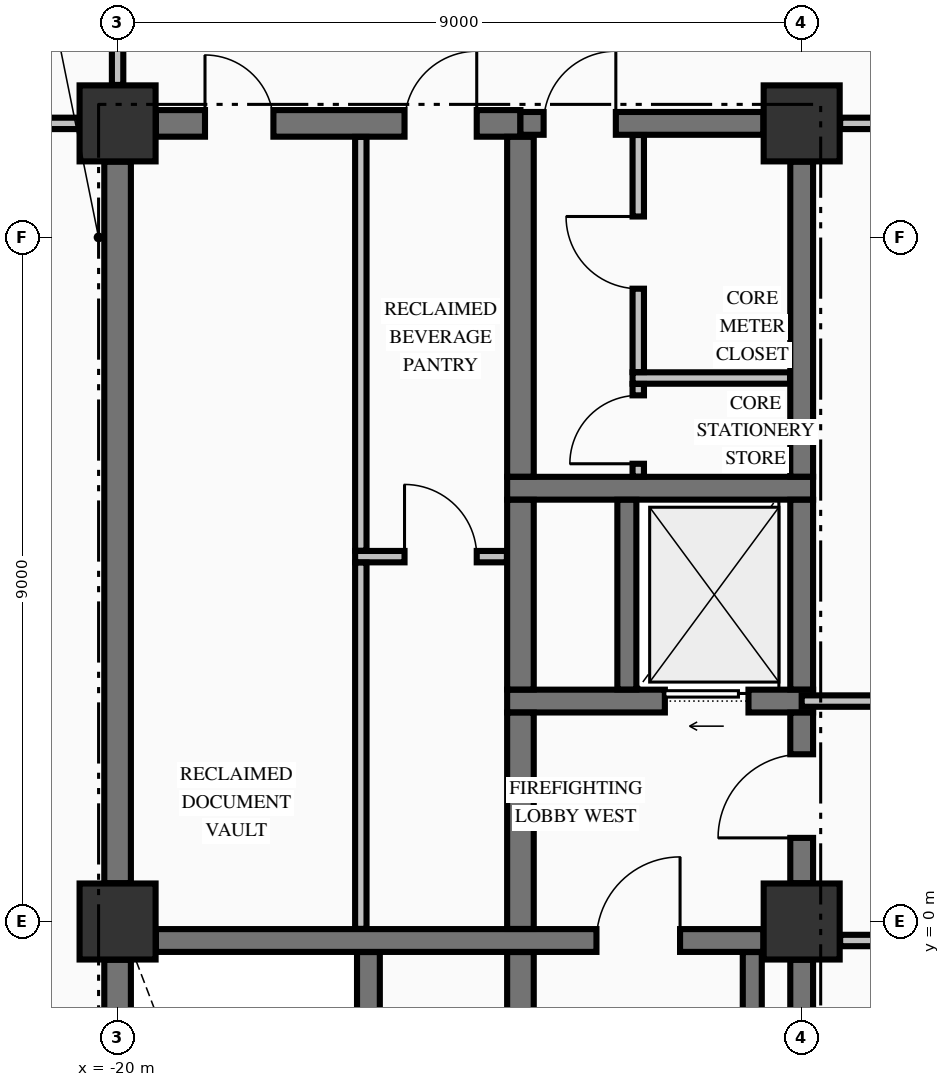
"""IFC4 building model, lengths in metres.
Left out: names, types, materials, properties, quantities, classifications, styles, units other than length and angle.
Written with IfcOpenShell. Run it as: python <this file> out.ifc"""

import sys

from ifc_helpers import new_model, si_unit, direction, frame, frame_2d, origin, origin_2d, place, context, subcontext, project, spatial, rectangle, extrude, element, fill, save


model = new_model("IFC4")
c1 = context("Model", 3, precision=1e-05, world=origin(), true_north=direction((0.0, 1.0)))
c2 = subcontext(c1, "Body", "Model", "MODEL_VIEW")
j1 = project(units=[si_unit("LENGTHUNIT", "METRE"), si_unit("PLANEANGLEUNIT", "RADIAN")], contexts=[c1])
p1 = place(None, origin())
s1 = spatial("IfcSite", under=j1, at=p1, CompositionType="ELEMENT")
p2 = place(p1, origin())
s2 = spatial("IfcBuilding", under=s1, at=p2, CompositionType="ELEMENT")
p3 = place(p2, frame((0.0, 0.0, 132.06)))
s3 = spatial("IfcBuildingStorey", under=s2, at=p3, CompositionType="ELEMENT", Elevation=132.06)
for number, where, z_axis, x_axis in (
    (1, (-20.0, 10.5, -0.25), (0.0, 0.0, 1.0), (1.0, 0.0, 0.0)),
    (2, (-11.0, 0.0, -0.25), (0.0, 0.0, 1.0), (1.0, 0.0, 0.0)),
    (3, (-11.0, 10.5, -0.25), (0.0, 0.0, 1.0), (1.0, 0.0, 0.0)),
    (4, (-20.0, 0.0, -0.25), (0.0, 0.0, 1.0), (1.0, 0.0, 0.0)),
):
    element("IfcColumn", number, at=place(p3, frame(where, z_axis=z_axis, x_axis=x_axis)), inside=s3, PredefinedType="COLUMN", context=c2, shape_type="SweptSolid", body=[
        extrude(rectangle(XDim=1.0, YDim=1.0, at=origin_2d()), origin(), (0.0, 0.0, 1.0), 3.57),
    ])
p4 = place(p3, frame((-19.496, -0.25, 0.0), z_axis=(0.0, 0.0, 1.0), x_axis=(1.0, 0.0, 0.0)))
e5 = element("IfcWall", 5, at=p4, inside=s3, PredefinedType="SHEAR", context=c2, shape_type="SweptSolid", body=[
    extrude(rectangle(XDim=7.992, YDim=0.3, at=frame_2d((3.996, 0.0))), origin(), (0.0, 0.0, 1.0), 3.32),
])
p5 = place(p4, frame((5.796, 0.0, 0.0)))
e6 = element("IfcOpeningElement", 6, at=p5, cuts=e5, PredefinedType="OPENING", context=c2, shape_type="SweptSolid", body=[
    extrude(rectangle(XDim=1.1, YDim=2.15, at=frame_2d((0.55, 1.075))), frame((0.0, 0.16, 0.0), z_axis=(0.0, -1.0, 0.0), x_axis=(1.0, 0.0, 0.0)), (0.0, 0.0, 1.0), 0.32),
])
p6 = place(p3, frame((-14.875, 2.9, 0.0), z_axis=(0.0, 0.0, 1.0), x_axis=(1.0, 0.0, 0.0)))
e7 = element("IfcWall", 7, at=p6, inside=s3, PredefinedType="SHEAR", context=c2, shape_type="SweptSolid", body=[
    extrude(rectangle(XDim=4.025, YDim=0.3, at=frame_2d((2.012, 0.0))), origin(), (0.0, 0.0, 1.0), 3.32),
])
p7 = place(p6, frame((2.075, 0.0, 0.0)))
e8 = element("IfcOpeningElement", 8, at=p7, cuts=e7, PredefinedType="OPENING", context=c2, shape_type="SweptSolid", body=[
    extrude(rectangle(XDim=1.1, YDim=2.2, at=frame_2d((0.55, 1.1))), frame((0.0, 0.16, 0.0), z_axis=(0.0, -1.0, 0.0), x_axis=(1.0, 0.0, 0.0)), (0.0, 0.0, 1.0), 0.32),
])
p8 = place(p3, frame((-14.875, 5.7, 0.0), z_axis=(0.0, 0.0, 1.0), x_axis=(1.0, 0.0, 0.0)))
e9 = element("IfcWall", 9, at=p8, inside=s3, PredefinedType="SHEAR", context=c2, shape_type="SweptSolid", body=[
    extrude(rectangle(XDim=4.025, YDim=0.3, at=frame_2d((2.012, 0.0))), origin(), (0.0, 0.0, 1.0), 3.32),
])
p9 = place(p3, frame((-19.496, 10.5, 0.0), z_axis=(0.0, 0.0, 1.0), x_axis=(1.0, 0.0, 0.0)))
e10 = element("IfcWall", 10, at=p9, inside=s3, PredefinedType="SHEAR", context=c2, shape_type="SweptSolid", body=[
    extrude(rectangle(XDim=4.796, YDim=0.35, at=frame_2d((2.398, 0.0))), origin(), (0.0, 0.0, 1.0), 3.32),
])
p10 = place(p9, frame((0.646, 0.0, 0.0)))
e11 = element("IfcOpeningElement", 11, at=p10, cuts=e10, PredefinedType="OPENING", context=c2, shape_type="SweptSolid", body=[
    extrude(rectangle(XDim=0.9, YDim=2.15, at=frame_2d((0.45, 1.075))), frame((0.0, 0.185, 0.0), z_axis=(0.0, -1.0, 0.0), x_axis=(1.0, 0.0, 0.0)), (0.0, 0.0, 1.0), 0.37),
])
p11 = place(p9, frame((3.271, 0.0, 0.0)))
e12 = element("IfcOpeningElement", 12, at=p11, cuts=e10, PredefinedType="OPENING", context=c2, shape_type="SweptSolid", body=[
    extrude(rectangle(XDim=0.95, YDim=2.15, at=frame_2d((0.475, 1.075))), frame((0.0, 0.185, 0.0), z_axis=(0.0, -1.0, 0.0), x_axis=(1.0, 0.0, 0.0)), (0.0, 0.0, 1.0), 0.37),
])
p12 = place(p3, frame((-14.7, 10.5, 0.0), z_axis=(0.0, 0.0, 1.0), x_axis=(1.0, 0.0, 0.0)))
e13 = element("IfcWall", 13, at=p12, inside=s3, PredefinedType="SHEAR", context=c2, shape_type="SweptSolid", body=[
    extrude(rectangle(XDim=3.196, YDim=0.3, at=frame_2d((1.598, 0.0))), origin(), (0.0, 0.0, 1.0), 3.32),
])
p13 = place(p12, frame((0.305, 0.0, 0.0)))
e14 = element("IfcOpeningElement", 14, at=p13, cuts=e13, PredefinedType="OPENING", context=c2, shape_type="SweptSolid", body=[
    extrude(rectangle(XDim=0.95, YDim=2.15, at=frame_2d((0.475, 1.075))), frame((0.0, 0.16, 0.0), z_axis=(0.0, -1.0, 0.0), x_axis=(1.0, 0.0, 0.0)), (0.0, 0.0, 1.0), 0.32),
])
p14 = place(p3, frame((-10.494, -0.25, 0.0), z_axis=(0.0, 0.0, 1.0), x_axis=(1.0, 0.0, 0.0)))
e15 = element("IfcWall", 15, at=p14, inside=s3, PredefinedType="PARTITIONING", context=c2, shape_type="SweptSolid", body=[
    extrude(rectangle(XDim=20.988, YDim=0.15, at=frame_2d((10.494, 0.0))), origin(), (0.0, 0.0, 1.0), 3.32),
])
p15 = place(p14, frame((6.944, 0.0, 0.0)))
e16 = element("IfcOpeningElement", 16, at=p15, cuts=e15, PredefinedType="OPENING", context=c2, shape_type="SweptSolid", body=[
    extrude(rectangle(XDim=1.1, YDim=2.15, at=frame_2d((0.55, 1.075))), frame((0.0, 0.085, 0.0), z_axis=(0.0, -1.0, 0.0), x_axis=(1.0, 0.0, 0.0)), (0.0, 0.0, 1.0), 0.17),
])
p16 = place(p14, frame((2.419, 0.0, 0.0)))
e17 = element("IfcOpeningElement", 17, at=p16, cuts=e15, PredefinedType="OPENING", context=c2, shape_type="SweptSolid", body=[
    extrude(rectangle(XDim=1.05, YDim=2.15, at=frame_2d((0.525, 1.075))), frame((0.0, 0.085, 0.0), z_axis=(0.0, -1.0, 0.0), x_axis=(1.0, 0.0, 0.0)), (0.0, 0.0, 1.0), 0.17),
])
p17 = place(p14, frame((14.569, 0.0, 0.0)))
e18 = element("IfcOpeningElement", 18, at=p17, cuts=e15, PredefinedType="OPENING", context=c2, shape_type="SweptSolid", body=[
    extrude(rectangle(XDim=0.95, YDim=2.15, at=frame_2d((0.475, 1.075))), frame((0.0, 0.085, 0.0), z_axis=(0.0, -1.0, 0.0), x_axis=(1.0, 0.0, 0.0)), (0.0, 0.0, 1.0), 0.17),
])
p18 = place(p3, frame((-11.0, 2.9, 0.0), z_axis=(0.0, 0.0, 1.0), x_axis=(1.0, 0.0, 0.0)))
e19 = element("IfcWall", 19, at=p18, inside=s3, PredefinedType="PARTITIONING", context=c2, shape_type="SweptSolid", body=[
    extrude(rectangle(XDim=22.0, YDim=0.15, at=frame_2d((11.0, 0.0))), origin(), (0.0, 0.0, 1.0), 3.32),
])
p19 = place(p18, frame((7.45, 0.0, 0.0)))
e20 = element("IfcOpeningElement", 20, at=p19, cuts=e19, PredefinedType="OPENING", context=c2, shape_type="SweptSolid", body=[
    extrude(rectangle(XDim=1.1, YDim=2.15, at=frame_2d((0.55, 1.075))), frame((0.0, 0.085, 0.0), z_axis=(0.0, -1.0, 0.0), x_axis=(1.0, 0.0, 0.0)), (0.0, 0.0, 1.0), 0.17),
])
p20 = place(p18, frame((2.925, 0.0, 0.0)))
e21 = element("IfcOpeningElement", 21, at=p20, cuts=e19, PredefinedType="OPENING", context=c2, shape_type="SweptSolid", body=[
    extrude(rectangle(XDim=1.05, YDim=2.15, at=frame_2d((0.525, 1.075))), frame((0.0, 0.085, 0.0), z_axis=(0.0, -1.0, 0.0), x_axis=(1.0, 0.0, 0.0)), (0.0, 0.0, 1.0), 0.17),
])
p21 = place(p18, frame((11.275, 0.0, 0.0)))
e22 = element("IfcOpeningElement", 22, at=p21, cuts=e19, PredefinedType="OPENING", context=c2, shape_type="SweptSolid", body=[
    extrude(rectangle(XDim=0.95, YDim=2.15, at=frame_2d((0.475, 1.075))), frame((0.0, 0.085, 0.0), z_axis=(0.0, -1.0, 0.0), x_axis=(1.0, 0.0, 0.0)), (0.0, 0.0, 1.0), 0.17),
])
p22 = place(p18, frame((17.725, 0.0, 0.0)))
e23 = element("IfcOpeningElement", 23, at=p22, cuts=e19, PredefinedType="OPENING", context=c2, shape_type="SweptSolid", body=[
    extrude(rectangle(XDim=0.95, YDim=2.15, at=frame_2d((0.475, 1.075))), frame((0.0, 0.085, 0.0), z_axis=(0.0, -1.0, 0.0), x_axis=(1.0, 0.0, 0.0)), (0.0, 0.0, 1.0), 0.17),
])
p23 = place(p3, frame((-16.875, 4.8, 0.0), z_axis=(0.0, 0.0, 1.0), x_axis=(1.0, 0.0, 0.0)))
e24 = element("IfcWall", 24, at=p23, inside=s3, PredefinedType="PARTITIONING", context=c2, shape_type="SweptSolid", body=[
    extrude(rectangle(XDim=1.997, YDim=0.15, at=frame_2d((0.999, 0.0))), origin(), (0.0, 0.0, 1.0), 3.32),
])
p24 = place(p23, frame((0.65, 0.0, 0.0)))
e25 = element("IfcOpeningElement", 25, at=p24, cuts=e24, PredefinedType="OPENING", context=c2, shape_type="SweptSolid", body=[
    extrude(rectangle(XDim=0.95, YDim=2.15, at=frame_2d((0.475, 1.075))), frame((0.0, 0.085, 0.0), z_axis=(0.0, -1.0, 0.0), x_axis=(1.0, 0.0, 0.0)), (0.0, 0.0, 1.0), 0.17),
])
p25 = place(p3, frame((-13.225, 7.15, 0.0), z_axis=(0.0, 0.0, 1.0), x_axis=(1.0, 0.0, 0.0)))
e26 = element("IfcWall", 26, at=p25, inside=s3, PredefinedType="PARTITIONING", context=c2, shape_type="SweptSolid", body=[
    extrude(rectangle(XDim=2.072, YDim=0.15, at=frame_2d((1.036, 0.0))), origin(), (0.0, 0.0, 1.0), 3.32),
])
p26 = place(p3, frame((-27.835, 10.5, 0.0), z_axis=(0.0, 0.0, 1.0), x_axis=(1.0, 0.0, 0.0)))
e27 = element("IfcWall", 27, at=p26, inside=s3, PredefinedType="PARTITIONING", context=c2, shape_type="SweptSolid", body=[
    extrude(rectangle(XDim=7.329, YDim=0.15, at=frame_2d((3.665, 0.0))), origin(), (0.0, 0.0, 1.0), 3.32),
])
p27 = place(p26, frame((3.335, 0.0, 0.0)))
e28 = element("IfcOpeningElement", 28, at=p27, cuts=e27, PredefinedType="OPENING", context=c2, shape_type="SweptSolid", body=[
    extrude(rectangle(XDim=1.0, YDim=2.15, at=frame_2d((0.5, 1.075))), frame((0.0, 0.085, 0.0), z_axis=(0.0, -1.0, 0.0), x_axis=(1.0, 0.0, 0.0)), (0.0, 0.0, 1.0), 0.17),
])
p28 = place(p3, frame((-10.494, 10.5, 0.0), z_axis=(0.0, 0.0, 1.0), x_axis=(1.0, 0.0, 0.0)))
e29 = element("IfcWall", 29, at=p28, inside=s3, PredefinedType="PARTITIONING", context=c2, shape_type="SweptSolid", body=[
    extrude(rectangle(XDim=20.988, YDim=0.15, at=frame_2d((10.494, 0.0))), origin(), (0.0, 0.0, 1.0), 3.32),
])
p29 = place(p28, frame((6.944, 0.0, 0.0)))
e30 = element("IfcOpeningElement", 30, at=p29, cuts=e29, PredefinedType="OPENING", context=c2, shape_type="SweptSolid", body=[
    extrude(rectangle(XDim=1.1, YDim=2.15, at=frame_2d((0.55, 1.075))), frame((0.0, 0.085, 0.0), z_axis=(0.0, -1.0, 0.0), x_axis=(1.0, 0.0, 0.0)), (0.0, 0.0, 1.0), 0.17),
])
p30 = place(p3, frame((-20.0, -9.446, 0.0), z_axis=(0.0, 0.0, 1.0), x_axis=(0.0, 1.0, 0.0)))
e31 = element("IfcWall", 31, at=p30, inside=s3, PredefinedType="SHEAR", context=c2, shape_type="SweptSolid", body=[
    extrude(rectangle(XDim=8.942, YDim=0.35, at=frame_2d((4.471, 0.0))), origin(), (0.0, 0.0, 1.0), 3.32),
])
p31 = place(p3, frame((-20.0, 0.504, 0.0), z_axis=(0.0, 0.0, 1.0), x_axis=(0.0, 1.0, 0.0)))
e32 = element("IfcWall", 32, at=p31, inside=s3, PredefinedType="SHEAR", context=c2, shape_type="SweptSolid", body=[
    extrude(rectangle(XDim=9.492, YDim=0.35, at=frame_2d((4.746, 0.0))), origin(), (0.0, 0.0, 1.0), 3.32),
])
p32 = place(p3, frame((-16.7, -9.773, 0.0), z_axis=(0.0, 0.0, 1.0), x_axis=(0.0, 1.0, 0.0)))
e33 = element("IfcWall", 33, at=p32, inside=s3, PredefinedType="SHEAR", context=c2, shape_type="SweptSolid", body=[
    extrude(rectangle(XDim=9.371, YDim=0.3, at=frame_2d((4.686, 0.0))), origin(), (0.0, 0.0, 1.0), 3.32),
])
p33 = place(p3, frame((-14.7, -9.773, 0.0), z_axis=(0.0, 0.0, 1.0), x_axis=(0.0, 1.0, 0.0)))
e34 = element("IfcWall", 34, at=p33, inside=s3, PredefinedType="SHEAR", context=c2, shape_type="SweptSolid", body=[
    extrude(rectangle(XDim=9.371, YDim=0.35, at=frame_2d((4.686, 0.0))), origin(), (0.0, 0.0, 1.0), 3.32),
])
p34 = place(p3, frame((-14.7, -0.098, 0.0), z_axis=(0.0, 0.0, 1.0), x_axis=(0.0, 1.0, 0.0)))
e35 = element("IfcWall", 35, at=p34, inside=s3, PredefinedType="SHEAR", context=c2, shape_type="SweptSolid", body=[
    extrude(rectangle(XDim=2.846, YDim=0.35, at=frame_2d((1.423, 0.0))), origin(), (0.0, 0.0, 1.0), 3.32),
])
p35 = place(p3, frame((-14.7, 3.052, 0.0), z_axis=(0.0, 0.0, 1.0), x_axis=(0.0, 1.0, 0.0)))
e36 = element("IfcWall", 36, at=p35, inside=s3, PredefinedType="SHEAR", context=c2, shape_type="SweptSolid", body=[
    extrude(rectangle(XDim=2.496, YDim=0.35, at=frame_2d((1.248, 0.0))), origin(), (0.0, 0.0, 1.0), 3.32),
])
p36 = place(p3, frame((-14.7, 5.852, 0.0), z_axis=(0.0, 0.0, 1.0), x_axis=(0.0, 1.0, 0.0)))
e37 = element("IfcWall", 37, at=p36, inside=s3, PredefinedType="SHEAR", context=c2, shape_type="SweptSolid", body=[
    extrude(rectangle(XDim=4.471, YDim=0.35, at=frame_2d((2.235, 0.0))), origin(), (0.0, 0.0, 1.0), 3.32),
])
p37 = place(p3, frame((-13.3, 3.052, 0.0), z_axis=(0.0, 0.0, 1.0), x_axis=(0.0, 1.0, 0.0)))
e38 = element("IfcWall", 38, at=p37, inside=s3, PredefinedType="SOLIDWALL", context=c2, shape_type="SweptSolid", body=[
    extrude(rectangle(XDim=2.496, YDim=0.25, at=frame_2d((1.248, 0.0))), origin(), (0.0, 0.0, 1.0), 3.32),
])
p38 = place(p3, frame((-11.65, -9.798, 0.0), z_axis=(0.0, 0.0, 1.0), x_axis=(0.0, 1.0, 0.0)))
e39 = element("IfcWall", 39, at=p38, inside=s3, PredefinedType="SOLIDWALL", context=c2, shape_type="SweptSolid", body=[
    extrude(rectangle(XDim=9.396, YDim=0.25, at=frame_2d((4.698, 0.0))), origin(), (0.0, 0.0, 1.0), 3.32),
])
p39 = place(p3, frame((-11.0, -9.446, 0.0), z_axis=(0.0, 0.0, 1.0), x_axis=(0.0, 1.0, 0.0)))
e40 = element("IfcWall", 40, at=p39, inside=s3, PredefinedType="SHEAR", context=c2, shape_type="SweptSolid", body=[
    extrude(rectangle(XDim=8.942, YDim=0.3, at=frame_2d((4.471, 0.0))), origin(), (0.0, 0.0, 1.0), 3.32),
])
p40 = place(p3, frame((-11.0, 0.504, 0.0), z_axis=(0.0, 0.0, 1.0), x_axis=(0.0, 1.0, 0.0)))
e41 = element("IfcWall", 41, at=p40, inside=s3, PredefinedType="SHEAR", context=c2, shape_type="SweptSolid", body=[
    extrude(rectangle(XDim=2.244, YDim=0.3, at=frame_2d((1.122, 0.0))), origin(), (0.0, 0.0, 1.0), 3.32),
])
p41 = place(p40, frame((0.596, 0.0, 0.0)))
e42 = element("IfcOpeningElement", 42, at=p41, cuts=e41, PredefinedType="OPENING", context=c2, shape_type="SweptSolid", body=[
    extrude(rectangle(XDim=1.1, YDim=2.15, at=frame_2d((0.55, 1.075))), frame((0.0, 0.16, 0.0), z_axis=(0.0, -1.0, 0.0), x_axis=(1.0, 0.0, 0.0)), (0.0, 0.0, 1.0), 0.32),
])
p42 = place(p3, frame((-11.0, 3.052, 0.0), z_axis=(0.0, 0.0, 1.0), x_axis=(0.0, 1.0, 0.0)))
e43 = element("IfcWall", 43, at=p42, inside=s3, PredefinedType="SHEAR", context=c2, shape_type="SweptSolid", body=[
    extrude(rectangle(XDim=2.496, YDim=0.3, at=frame_2d((1.248, 0.0))), origin(), (0.0, 0.0, 1.0), 3.32),
])
p43 = place(p3, frame((-11.0, 5.852, 0.0), z_axis=(0.0, 0.0, 1.0), x_axis=(0.0, 1.0, 0.0)))
e44 = element("IfcWall", 44, at=p43, inside=s3, PredefinedType="SHEAR", context=c2, shape_type="SweptSolid", body=[
    extrude(rectangle(XDim=4.144, YDim=0.3, at=frame_2d((2.072, 0.0))), origin(), (0.0, 0.0, 1.0), 3.32),
])
p44 = place(p3, frame((-20.0, 11.006, 0.0), z_axis=(0.0, 0.0, 1.0), x_axis=(0.0, 1.0, 0.0)))
e45 = element("IfcWall", 45, at=p44, inside=s3, PredefinedType="PARTITIONING", context=c2, shape_type="SweptSolid", body=[
    extrude(rectangle(XDim=2.716, YDim=0.15, at=frame_2d((1.358, 0.0))), origin(), (0.0, 0.0, 1.0), 2.81),
])
p45 = place(p44, frame((0.669, 0.0, 0.0)))
e46 = element("IfcOpeningElement", 46, at=p45, cuts=e45, PredefinedType="OPENING", context=c2, shape_type="SweptSolid", body=[
    extrude(rectangle(XDim=0.95, YDim=2.15, at=frame_2d((0.475, 1.075))), frame((0.0, 0.085, 0.0), z_axis=(0.0, -1.0, 0.0), x_axis=(1.0, 0.0, 0.0)), (0.0, 0.0, 1.0), 0.17),
])
p46 = place(p3, frame((-16.8, -0.097, 0.0), z_axis=(0.0, 0.0, 1.0), x_axis=(0.0, 1.0, 0.0)))
e47 = element("IfcWall", 47, at=p46, inside=s3, PredefinedType="PARTITIONING", context=c2, shape_type="SweptSolid", body=[
    extrude(rectangle(XDim=4.819, YDim=0.15, at=frame_2d((2.409, 0.0))), origin(), (0.0, 0.0, 1.0), 3.32),
])
p47 = place(p3, frame((-16.8, 4.878, 0.0), z_axis=(0.0, 0.0, 1.0), x_axis=(0.0, 1.0, 0.0)))
e48 = element("IfcWall", 48, at=p47, inside=s3, PredefinedType="PARTITIONING", context=c2, shape_type="SweptSolid", body=[
    extrude(rectangle(XDim=5.444, YDim=0.15, at=frame_2d((2.722, 0.0))), origin(), (0.0, 0.0, 1.0), 3.32),
])
p48 = place(p3, frame((-13.15, 5.853, 0.0), z_axis=(0.0, 0.0, 1.0), x_axis=(0.0, 1.0, 0.0)))
e49 = element("IfcWall", 49, at=p48, inside=s3, PredefinedType="PARTITIONING", context=c2, shape_type="SweptSolid", body=[
    extrude(rectangle(XDim=1.219, YDim=0.15, at=frame_2d((0.609, 0.0))), origin(), (0.0, 0.0, 1.0), 3.32),
])
p49 = place(p48, frame((0.169, 0.0, 0.0)))
e50 = element("IfcOpeningElement", 50, at=p49, cuts=e49, PredefinedType="OPENING", context=c2, shape_type="SweptSolid", body=[
    extrude(rectangle(XDim=0.9, YDim=2.15, at=frame_2d((0.45, 1.075))), frame((0.0, 0.085, 0.0), z_axis=(0.0, -1.0, 0.0), x_axis=(1.0, 0.0, 0.0)), (0.0, 0.0, 1.0), 0.17),
])
p50 = place(p3, frame((-13.15, 7.228, 0.0), z_axis=(0.0, 0.0, 1.0), x_axis=(0.0, 1.0, 0.0)))
e51 = element("IfcWall", 51, at=p50, inside=s3, PredefinedType="PARTITIONING", context=c2, shape_type="SweptSolid", body=[
    extrude(rectangle(XDim=3.119, YDim=0.15, at=frame_2d((1.56, 0.0))), origin(), (0.0, 0.0, 1.0), 3.32),
])
p51 = place(p50, frame((1.097, 0.0, 0.0)))
e52 = element("IfcOpeningElement", 52, at=p51, cuts=e51, PredefinedType="OPENING", context=c2, shape_type="SweptSolid", body=[
    extrude(rectangle(XDim=0.95, YDim=2.15, at=frame_2d((0.475, 1.075))), frame((0.0, 0.085, 0.0), z_axis=(0.0, -1.0, 0.0), x_axis=(1.0, 0.0, 0.0)), (0.0, 0.0, 1.0), 0.17),
])
p52 = place(p5, origin())
e53 = element("IfcDoor", 53, at=p52, inside=s3, OperationType="SINGLE_SWING_RIGHT", PredefinedType="DOOR", context=c2, shape_type="SweptSolid", body=[
    extrude(rectangle(XDim=1.1, YDim=2.15, at=frame_2d((0.55, 1.075))), frame((0.0, 0.025, 0.0), z_axis=(0.0, -1.0, 0.0), x_axis=(1.0, 0.0, 0.0)), (0.0, 0.0, 1.0), 0.05),
])
fill(e6, e53)
p53 = place(p41, origin())
e54 = element("IfcDoor", 54, at=p53, inside=s3, OperationType="SINGLE_SWING_LEFT", PredefinedType="DOOR", context=c2, shape_type="SweptSolid", body=[
    extrude(rectangle(XDim=1.1, YDim=2.15, at=frame_2d((0.55, 1.075))), frame((0.0, 0.025, 0.0), z_axis=(0.0, -1.0, 0.0), x_axis=(1.0, 0.0, 0.0)), (0.0, 0.0, 1.0), 0.05),
])
fill(e42, e54)
p54 = place(p7, origin())
e55 = element("IfcDoor", 55, at=p54, inside=s3, OperationType="SLIDING_TO_LEFT", PredefinedType="DOOR", context=c2, shape_type="SweptSolid", body=[
    extrude(rectangle(XDim=1.1, YDim=2.2, at=frame_2d((0.55, 1.1))), frame((0.0, 0.025, 0.0), z_axis=(0.0, -1.0, 0.0), x_axis=(1.0, 0.0, 0.0)), (0.0, 0.0, 1.0), 0.05),
])
fill(e8, e55)
p55 = place(p13, origin())
e56 = element("IfcDoor", 56, at=p55, inside=s3, OperationType="SINGLE_SWING_RIGHT", PredefinedType="DOOR", context=c2, shape_type="SweptSolid", body=[
    extrude(rectangle(XDim=0.95, YDim=2.15, at=frame_2d((0.475, 1.075))), frame((0.0, 0.025, 0.0), z_axis=(0.0, -1.0, 0.0), x_axis=(1.0, 0.0, 0.0)), (0.0, 0.0, 1.0), 0.05),
])
fill(e14, e56)
p56 = place(p49, origin())
e57 = element("IfcDoor", 57, at=p56, inside=s3, OperationType="SINGLE_SWING_LEFT", PredefinedType="DOOR", context=c2, shape_type="SweptSolid", body=[
    extrude(rectangle(XDim=0.9, YDim=2.15, at=frame_2d((0.45, 1.075))), frame((0.0, 0.025, 0.0), z_axis=(0.0, -1.0, 0.0), x_axis=(1.0, 0.0, 0.0)), (0.0, 0.0, 1.0), 0.05),
])
fill(e50, e57)
p57 = place(p51, origin())
e58 = element("IfcDoor", 58, at=p57, inside=s3, OperationType="SINGLE_SWING_RIGHT", PredefinedType="DOOR", context=c2, shape_type="SweptSolid", body=[
    extrude(rectangle(XDim=0.95, YDim=2.15, at=frame_2d((0.475, 1.075))), frame((0.0, 0.025, 0.0), z_axis=(0.0, -1.0, 0.0), x_axis=(1.0, 0.0, 0.0)), (0.0, 0.0, 1.0), 0.05),
])
fill(e52, e58)
p58 = place(p10, origin())
e59 = element("IfcDoor", 59, at=p58, inside=s3, OperationType="SINGLE_SWING_LEFT", PredefinedType="DOOR", context=c2, shape_type="SweptSolid", body=[
    extrude(rectangle(XDim=0.9, YDim=2.15, at=frame_2d((0.45, 1.075))), frame((0.0, 0.025, 0.0), z_axis=(0.0, -1.0, 0.0), x_axis=(1.0, 0.0, 0.0)), (0.0, 0.0, 1.0), 0.05),
])
fill(e11, e59)
p59 = place(p11, origin())
e60 = element("IfcDoor", 60, at=p59, inside=s3, OperationType="SINGLE_SWING_RIGHT", PredefinedType="DOOR", context=c2, shape_type="SweptSolid", body=[
    extrude(rectangle(XDim=0.95, YDim=2.15, at=frame_2d((0.475, 1.075))), frame((0.0, 0.025, 0.0), z_axis=(0.0, -1.0, 0.0), x_axis=(1.0, 0.0, 0.0)), (0.0, 0.0, 1.0), 0.05),
])
fill(e12, e60)
p60 = place(p24, origin())
e61 = element("IfcDoor", 61, at=p60, inside=s3, OperationType="SINGLE_SWING_LEFT", PredefinedType="DOOR", context=c2, shape_type="SweptSolid", body=[
    extrude(rectangle(XDim=0.95, YDim=2.15, at=frame_2d((0.475, 1.075))), frame((0.0, 0.025, 0.0), z_axis=(0.0, -1.0, 0.0), x_axis=(1.0, 0.0, 0.0)), (0.0, 0.0, 1.0), 0.05),
])
fill(e25, e61)
save(model, sys.argv[1])
